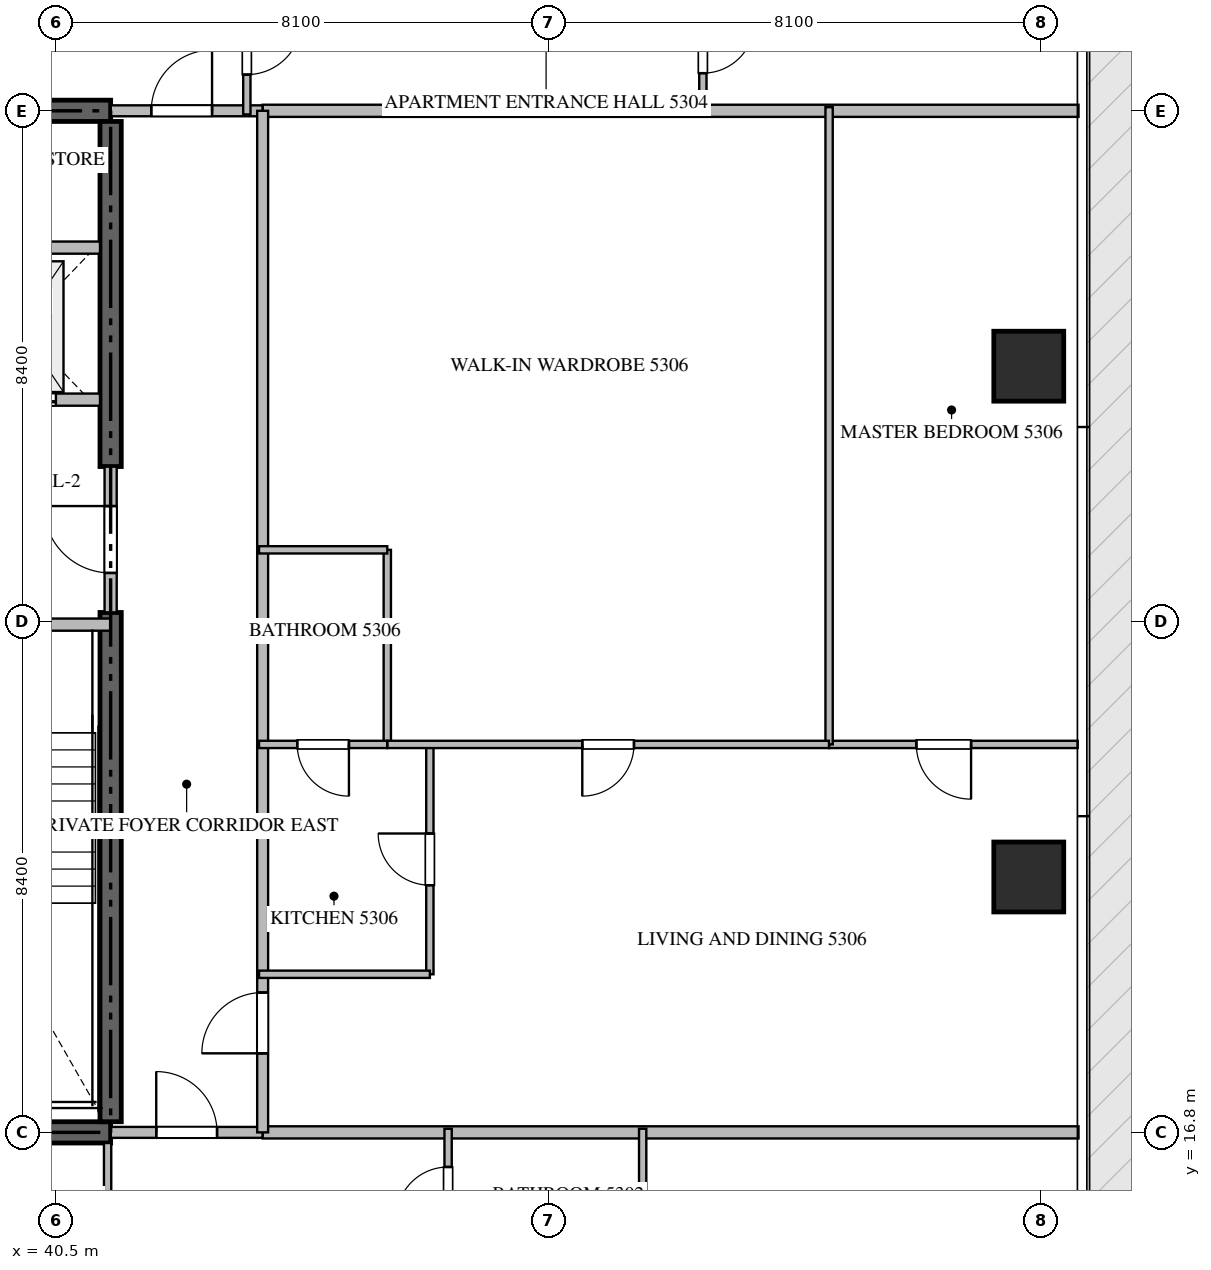
"""IFC4 building model, lengths in metres.
Left out: names, types, materials, properties, quantities, classifications, styles, units other than length and angle.
Written with IfcOpenShell. Run it as: python <this file> out.ifc"""

import sys

from ifc_helpers import new_model, si_unit, direction, frame, frame_2d, origin, origin_2d, place, context, subcontext, project, spatial, rectangle, extrude, source, transform, mapped, element, fill, save


model = new_model("IFC4")
c1 = context("Model", 3, precision=1e-05, world=origin(), true_north=direction((0.0, 1.0)))
c2 = subcontext(c1, "Body", "Model", "MODEL_VIEW")
j1 = project(units=[si_unit("LENGTHUNIT", "METRE"), si_unit("PLANEANGLEUNIT", "RADIAN")], contexts=[c1])
p1 = place(None, origin())
s1 = spatial("IfcSite", under=j1, at=p1, CompositionType="ELEMENT")
p2 = place(p1, origin())
s2 = spatial("IfcBuilding", under=s1, at=p2, CompositionType="ELEMENT")
p3 = place(p2, frame((0.0, 0.0, 214.3)))
s3 = spatial("IfcBuildingStorey", under=s2, at=p3, CompositionType="ELEMENT", Elevation=214.3)
for number, where, z_axis, x_axis in (
    (1, (23.4, 16.8, -0.26), (0.0, 0.0, 1.0), (1.0, 0.0, 0.0)),
    (2, (41.4, 33.6, -0.26), (0.0, 0.0, 1.0), (-1.0, 0.0, 0.0)),
):
    element("IfcWall", number, at=place(p3, frame(where, z_axis=z_axis, x_axis=x_axis)), inside=s3, PredefinedType="SHEAR", context=c2, shape_type="SweptSolid", body=[
        extrude(rectangle(XDim=18.0, YDim=0.35, at=frame_2d((9.0, 0.0))), origin(), (0.0, 0.0, 1.0), 3.848),
    ])
p4 = place(p3, frame((41.4, 16.975, -0.26), z_axis=(0.0, 0.0, 1.0), x_axis=(0.0, 1.0, 0.0)))
e3 = element("IfcWall", 3, at=p4, inside=s3, PredefinedType="SHEAR", context=c2, shape_type="SweptSolid", body=[
    extrude(rectangle(XDim=8.375, YDim=0.35, at=frame_2d((4.188, 0.0))), origin(), (0.0, 0.0, 1.0), 3.848),
])
p5 = place(p3, frame((41.4, 27.75, -0.26), z_axis=(0.0, 0.0, 1.0), x_axis=(0.0, 1.0, 0.0)))
e4 = element("IfcWall", 4, at=p5, inside=s3, PredefinedType="SHEAR", context=c2, shape_type="SweptSolid", body=[
    extrude(rectangle(XDim=5.675, YDim=0.35, at=frame_2d((2.837, 0.0))), origin(), (0.0, 0.0, 1.0), 3.848),
])
m1 = source(origin(), c2, "Body", "SweptSolid", [
    extrude(rectangle(XDim=1.15, YDim=1.15, at=origin_2d()), origin(), (0.0, 0.0, 1.0), 3.85),
])
for number, where, z_axis, x_axis in (
    (5, (56.5, 21.0, -0.26), (0.0, 0.0, 1.0), (1.0, 0.0, 0.0)),
    (6, (56.5, 29.4, -0.26), (0.0, 0.0, 1.0), (1.0, 0.0, 0.0)),
):
    element("IfcColumn", number, at=place(p3, frame(where, z_axis=z_axis, x_axis=x_axis)), inside=s3, PredefinedType="COLUMN", context=c2, shape_type="MappedRepresentation", body=[
        mapped(m1, transform((0.0, 0.0, 0.0), scale=1.0)),
    ])
p6 = place(p3, frame((36.95, 25.15, 0.0), z_axis=(0.0, 0.0, 1.0), x_axis=(1.0, 0.0, 0.0)))
e7 = element("IfcWall", 7, at=p6, inside=s3, PredefinedType="STANDARD", context=c2, shape_type="SweptSolid", body=[
    extrude(rectangle(XDim=4.45, YDim=0.2, at=frame_2d((2.225, 0.0))), origin(), (0.0, 0.0, 1.0), 3.59),
])
p7 = place(p6, frame((1.65, 0.0, 0.0)))
e8 = element("IfcOpeningElement", 8, at=p7, cuts=e7, PredefinedType="OPENING", context=c2, shape_type="SweptSolid", body=[
    extrude(rectangle(XDim=1.1, YDim=2.15, at=frame_2d((0.55, 1.075))), frame((0.0, 0.11, 0.0), z_axis=(0.0, -1.0, 0.0), x_axis=(1.0, 0.0, 0.0)), (0.0, 0.0, 1.0), 0.22),
])
p8 = place(p3, frame((38.75, 28.85, 0.0), z_axis=(0.0, 0.0, 1.0), x_axis=(1.0, 0.0, 0.0)))
e9 = element("IfcWall", 9, at=p8, inside=s3, PredefinedType="STANDARD", context=c2, shape_type="SweptSolid", body=[
    extrude(rectangle(XDim=2.475, YDim=0.2, at=frame_2d((1.238, 0.0))), origin(), (0.0, 0.0, 1.0), 3.59),
])
p9 = place(p8, frame((0.55, 0.0, 0.0)))
e10 = element("IfcOpeningElement", 10, at=p9, cuts=e9, PredefinedType="OPENING", context=c2, shape_type="SweptSolid", body=[
    extrude(rectangle(XDim=1.2, YDim=2.2, at=frame_2d((0.6, 1.1))), frame((0.0, 0.11, 0.0), z_axis=(0.0, -1.0, 0.0), x_axis=(1.0, 0.0, 0.0)), (0.0, 0.0, 1.0), 0.22),
])
p10 = place(p3, frame((38.75, 31.35, 0.0), z_axis=(0.0, 0.0, 1.0), x_axis=(1.0, 0.0, 0.0)))
e11 = element("IfcWall", 11, at=p10, inside=s3, PredefinedType="STANDARD", context=c2, shape_type="SweptSolid", body=[
    extrude(rectangle(XDim=2.475, YDim=0.2, at=frame_2d((1.238, 0.0))), origin(), (0.0, 0.0, 1.0), 3.59),
])
p11 = place(p3, frame((41.4, 25.352, 0.0), z_axis=(0.0, 0.0, 1.0), x_axis=(0.0, 1.0, 0.0)))
e12 = element("IfcWall", 12, at=p11, inside=s3, PredefinedType="STANDARD", context=c2, shape_type="SweptSolid", body=[
    extrude(rectangle(XDim=2.396, YDim=0.2, at=frame_2d((1.198, 0.0))), origin(), (0.0, 0.0, 1.0), 3.59),
])
p12 = place(p11, frame((0.648, 0.0, 0.0)))
e13 = element("IfcOpeningElement", 13, at=p12, cuts=e12, PredefinedType="OPENING", context=c2, shape_type="SweptSolid", body=[
    extrude(rectangle(XDim=1.1, YDim=2.15, at=frame_2d((0.55, 1.075))), frame((0.0, 0.11, 0.0), z_axis=(0.0, -1.0, 0.0), x_axis=(1.0, 0.0, 0.0)), (0.0, 0.0, 1.0), 0.22),
])
for number, where, z_axis, x_axis in (
    (14, (43.9, 16.8, 0.0), (0.0, 0.0, 1.0), (1.0, 0.0, 0.0)),
    (15, (43.9, 33.6, 0.0), (0.0, 0.0, 1.0), (1.0, 0.0, 0.0)),
):
    element("IfcWall", number, at=place(p3, frame(where, z_axis=z_axis, x_axis=x_axis)), inside=s3, PredefinedType="PARTITIONING", context=c2, shape_type="SweptSolid", body=[
        extrude(rectangle(XDim=13.418, YDim=0.2, at=frame_2d((6.709, 0.0))), origin(), (0.0, 0.0, 1.0), 3.59),
    ])
p13 = place(p3, frame((41.402, 16.8, 0.0), z_axis=(0.0, 0.0, 1.0), x_axis=(1.0, 0.0, 0.0)))
e16 = element("IfcWall", 16, at=p13, inside=s3, PredefinedType="PARTITIONING", context=c2, shape_type="SweptSolid", body=[
    extrude(rectangle(XDim=2.496, YDim=0.18, at=frame_2d((1.248, 0.0))), origin(), (0.0, 0.0, 1.0), 3.59),
])
p14 = place(p13, frame((0.748, 0.0, 0.0)))
e17 = element("IfcOpeningElement", 17, at=p14, cuts=e16, PredefinedType="OPENING", context=c2, shape_type="SweptSolid", body=[
    extrude(rectangle(XDim=1.0, YDim=2.15, at=frame_2d((0.5, 1.075))), frame((0.0, 0.1, 0.0), z_axis=(0.0, -1.0, 0.0), x_axis=(1.0, 0.0, 0.0)), (0.0, 0.0, 1.0), 0.2),
])
p15 = place(p3, frame((41.402, 33.6, 0.0), z_axis=(0.0, 0.0, 1.0), x_axis=(1.0, 0.0, 0.0)))
e18 = element("IfcWall", 18, at=p15, inside=s3, PredefinedType="PARTITIONING", context=c2, shape_type="SweptSolid", body=[
    extrude(rectangle(XDim=2.496, YDim=0.18, at=frame_2d((1.248, 0.0))), origin(), (0.0, 0.0, 1.0), 3.59),
])
p16 = place(p15, frame((0.666, 0.0, 0.0)))
e19 = element("IfcOpeningElement", 19, at=p16, cuts=e18, PredefinedType="OPENING", context=c2, shape_type="SweptSolid", body=[
    extrude(rectangle(XDim=1.0, YDim=2.15, at=frame_2d((0.5, 1.075))), frame((0.0, 0.1, 0.0), z_axis=(0.0, -1.0, 0.0), x_axis=(1.0, 0.0, 0.0)), (0.0, 0.0, 1.0), 0.2),
])
p17 = place(p3, frame((43.9, 16.8, 0.0), z_axis=(0.0, 0.0, 1.0), x_axis=(0.0, 1.0, 0.0)))
e20 = element("IfcWall", 20, at=p17, inside=s3, PredefinedType="PARTITIONING", context=c2, shape_type="SweptSolid", body=[
    extrude(rectangle(XDim=16.8, YDim=0.18, at=frame_2d((8.4, 0.0))), origin(), (0.0, 0.0, 1.0), 3.59),
])
p18 = place(p17, frame((1.3, 0.0, 0.0)))
e21 = element("IfcOpeningElement", 21, at=p18, cuts=e20, PredefinedType="OPENING", context=c2, shape_type="SweptSolid", body=[
    extrude(rectangle(XDim=1.0, YDim=2.15, at=frame_2d((0.5, 1.075))), frame((0.0, 0.1, 0.0), z_axis=(0.0, -1.0, 0.0), x_axis=(1.0, 0.0, 0.0)), (0.0, 0.0, 1.0), 0.2),
])
p19 = place(p3, frame((41.35, 14.05, 0.0), z_axis=(0.0, 0.0, 1.0), x_axis=(0.0, 1.0, 0.0)))
e22 = element("IfcWall", 22, at=p19, inside=s3, PredefinedType="PARTITIONING", context=c2, shape_type="SweptSolid", body=[
    extrude(rectangle(XDim=2.575, YDim=0.12, at=frame_2d((1.288, 0.0))), origin(), (0.0, 0.0, 1.0), 3.59),
])
p20 = place(p3, frame((50.15, 14.75, 0.0), z_axis=(0.0, 0.0, 1.0), x_axis=(0.0, 1.0, 0.0)))
e23 = element("IfcWall", 23, at=p20, inside=s3, PredefinedType="PARTITIONING", context=c2, shape_type="SweptSolid", body=[
    extrude(rectangle(XDim=2.11, YDim=0.12, at=frame_2d((1.055, 0.0))), origin(), (0.0, 0.0, 1.0), 3.59),
])
p21 = place(p3, frame((46.95, 14.752, 0.0), z_axis=(0.0, 0.0, 1.0), x_axis=(0.0, 1.0, 0.0)))
e24 = element("IfcWall", 24, at=p21, inside=s3, PredefinedType="PARTITIONING", context=c2, shape_type="SweptSolid", body=[
    extrude(rectangle(XDim=2.108, YDim=0.12, at=frame_2d((1.054, 0.0))), origin(), (0.0, 0.0, 1.0), 3.59),
])
p22 = place(p21, frame((0.629, 0.0, 0.0)))
e25 = element("IfcOpeningElement", 25, at=p22, cuts=e24, PredefinedType="OPENING", context=c2, shape_type="SweptSolid", body=[
    extrude(rectangle(XDim=0.85, YDim=2.1, at=frame_2d((0.425, 1.05))), frame((0.0, 0.07, 0.0), z_axis=(0.0, -1.0, 0.0), x_axis=(1.0, 0.0, 0.0)), (0.0, 0.0, 1.0), 0.14),
])
p23 = place(p3, frame((43.64, 35.75, 0.0), z_axis=(0.0, 0.0, 1.0), x_axis=(0.0, -1.0, 0.0)))
e26 = element("IfcWall", 26, at=p23, inside=s3, PredefinedType="PARTITIONING", context=c2, shape_type="SweptSolid", body=[
    extrude(rectangle(XDim=2.21, YDim=0.12, at=frame_2d((1.105, 0.0))), origin(), (0.0, 0.0, 1.0), 3.59),
])
p24 = place(p23, frame((0.655, 0.0, 0.0)))
e27 = element("IfcOpeningElement", 27, at=p24, cuts=e26, PredefinedType="OPENING", context=c2, shape_type="SweptSolid", body=[
    extrude(rectangle(XDim=0.9, YDim=2.1, at=frame_2d((0.45, 1.05))), frame((0.0, 0.07, 0.0), z_axis=(0.0, -1.0, 0.0), x_axis=(1.0, 0.0, 0.0)), (0.0, 0.0, 1.0), 0.14),
])
p25 = place(p3, frame((51.14, 35.748, 0.0), z_axis=(0.0, 0.0, 1.0), x_axis=(0.0, -1.0, 0.0)))
e28 = element("IfcWall", 28, at=p25, inside=s3, PredefinedType="PARTITIONING", context=c2, shape_type="SweptSolid", body=[
    extrude(rectangle(XDim=2.208, YDim=0.12, at=frame_2d((1.104, 0.0))), origin(), (0.0, 0.0, 1.0), 3.59),
])
p26 = place(p25, frame((0.679, 0.0, 0.0)))
e29 = element("IfcOpeningElement", 29, at=p26, cuts=e28, PredefinedType="OPENING", context=c2, shape_type="SweptSolid", body=[
    extrude(rectangle(XDim=0.85, YDim=2.1, at=frame_2d((0.425, 1.05))), frame((0.0, 0.07, 0.0), z_axis=(0.0, -1.0, 0.0), x_axis=(1.0, 0.0, 0.0)), (0.0, 0.0, 1.0), 0.14),
])
p27 = place(p3, frame((46.65, 19.4, 0.0), z_axis=(0.0, 0.0, 1.0), x_axis=(0.0, 1.0, 0.0)))
e30 = element("IfcWall", 30, at=p27, inside=s3, PredefinedType="PARTITIONING", context=c2, shape_type="SweptSolid", body=[
    extrude(rectangle(XDim=3.78, YDim=0.12, at=frame_2d((1.89, 0.0))), origin(), (0.0, 0.0, 1.0), 3.59),
])
p28 = place(p27, frame((1.465, 0.0, 0.0)))
e31 = element("IfcOpeningElement", 31, at=p28, cuts=e30, PredefinedType="OPENING", context=c2, shape_type="SweptSolid", body=[
    extrude(rectangle(XDim=0.85, YDim=2.1, at=frame_2d((0.425, 1.05))), frame((0.0, 0.07, 0.0), z_axis=(0.0, -1.0, 0.0), x_axis=(1.0, 0.0, 0.0)), (0.0, 0.0, 1.0), 0.14),
])
p29 = place(p3, frame((46.65, 19.4, 0.0), z_axis=(0.0, 0.0, 1.0), x_axis=(-1.0, 0.0, 0.0)))
e32 = element("IfcWall", 32, at=p29, inside=s3, PredefinedType="PARTITIONING", context=c2, shape_type="SweptSolid", body=[
    extrude(rectangle(XDim=2.81, YDim=0.12, at=frame_2d((1.405, 0.0))), origin(), (0.0, 0.0, 1.0), 3.59),
])
p30 = place(p3, frame((57.305, 23.18, 0.0), z_axis=(0.0, 0.0, 1.0), x_axis=(-1.0, 0.0, 0.0)))
e33 = element("IfcWall", 33, at=p30, inside=s3, PredefinedType="PARTITIONING", context=c2, shape_type="SweptSolid", body=[
    extrude(rectangle(XDim=4.089, YDim=0.12, at=frame_2d((2.044, 0.0))), origin(), (0.0, 0.0, 1.0), 3.59),
])
p31 = place(p30, frame((1.754, 0.0, 0.0)))
e34 = element("IfcOpeningElement", 34, at=p31, cuts=e33, PredefinedType="OPENING", context=c2, shape_type="SweptSolid", body=[
    extrude(rectangle(XDim=0.9, YDim=2.1, at=frame_2d((0.45, 1.05))), frame((0.0, 0.07, 0.0), z_axis=(0.0, -1.0, 0.0), x_axis=(1.0, 0.0, 0.0)), (0.0, 0.0, 1.0), 0.14),
])
p32 = place(p3, frame((53.216, 23.18, 0.0), z_axis=(0.0, 0.0, 1.0), x_axis=(0.0, 1.0, 0.0)))
e35 = element("IfcWall", 35, at=p32, inside=s3, PredefinedType="PARTITIONING", context=c2, shape_type="SweptSolid", body=[
    extrude(rectangle(XDim=10.48, YDim=0.12, at=frame_2d((5.24, 0.0))), origin(), (0.0, 0.0, 1.0), 3.59),
])
p33 = place(p3, frame((45.95, 23.18, 0.0), z_axis=(0.0, 0.0, 1.0), x_axis=(0.0, 1.0, 0.0)))
e36 = element("IfcWall", 36, at=p33, inside=s3, PredefinedType="PARTITIONING", context=c2, shape_type="SweptSolid", body=[
    extrude(rectangle(XDim=3.2, YDim=0.12, at=frame_2d((1.6, 0.0))), origin(), (0.0, 0.0, 1.0), 3.59),
])
p34 = place(p3, frame((45.95, 26.38, 0.0), z_axis=(0.0, 0.0, 1.0), x_axis=(-1.0, 0.0, 0.0)))
e37 = element("IfcWall", 37, at=p34, inside=s3, PredefinedType="PARTITIONING", context=c2, shape_type="SweptSolid", body=[
    extrude(rectangle(XDim=2.11, YDim=0.12, at=frame_2d((1.055, 0.0))), origin(), (0.0, 0.0, 1.0), 3.59),
])
p35 = place(p3, frame((53.214, 23.18, 0.0), z_axis=(0.0, 0.0, 1.0), x_axis=(-1.0, 0.0, 0.0)))
e38 = element("IfcWall", 38, at=p35, inside=s3, PredefinedType="PARTITIONING", context=c2, shape_type="SweptSolid", body=[
    extrude(rectangle(XDim=7.264, YDim=0.12, at=frame_2d((3.632, 0.0))), origin(), (0.0, 0.0, 1.0), 3.59),
])
p36 = place(p35, frame((3.207, 0.0, 0.0)))
e39 = element("IfcOpeningElement", 39, at=p36, cuts=e38, PredefinedType="OPENING", context=c2, shape_type="SweptSolid", body=[
    extrude(rectangle(XDim=0.85, YDim=2.1, at=frame_2d((0.425, 1.05))), frame((0.0, 0.07, 0.0), z_axis=(0.0, -1.0, 0.0), x_axis=(1.0, 0.0, 0.0)), (0.0, 0.0, 1.0), 0.14),
])
p37 = place(p3, frame((45.948, 23.18, 0.0), z_axis=(0.0, 0.0, 1.0), x_axis=(-1.0, 0.0, 0.0)))
e40 = element("IfcWall", 40, at=p37, inside=s3, PredefinedType="PARTITIONING", context=c2, shape_type="SweptSolid", body=[
    extrude(rectangle(XDim=2.108, YDim=0.12, at=frame_2d((1.054, 0.0))), origin(), (0.0, 0.0, 1.0), 3.59),
])
p38 = place(p37, frame((0.629, 0.0, 0.0)))
e41 = element("IfcOpeningElement", 41, at=p38, cuts=e40, PredefinedType="OPENING", context=c2, shape_type="SweptSolid", body=[
    extrude(rectangle(XDim=0.85, YDim=2.1, at=frame_2d((0.425, 1.05))), frame((0.0, 0.07, 0.0), z_axis=(0.0, -1.0, 0.0), x_axis=(1.0, 0.0, 0.0)), (0.0, 0.0, 1.0), 0.14),
])
m2 = source(origin(), c2, "Body", "SweptSolid", [
    extrude(rectangle(XDim=1.2, YDim=2.2, at=frame_2d((0.6, 1.1))), frame((0.0, 0.025, 0.0), z_axis=(0.0, -1.0, 0.0), x_axis=(1.0, 0.0, 0.0)), (0.0, 0.0, 1.0), 0.05),
])
p39 = place(p9, origin())
e42 = element("IfcDoor", 42, at=p39, inside=s3, OperationType="DOUBLE_DOOR_SLIDING", PredefinedType="DOOR", context=c2, shape_type="MappedRepresentation", body=[
    mapped(m2, transform((0.0, 0.0, 0.0), scale=1.0)),
])
fill(e10, e42)
m3 = source(origin(), c2, "Body", "SweptSolid", [
    extrude(rectangle(XDim=1.1, YDim=2.15, at=frame_2d((0.55, 1.075))), frame((0.0, 0.025, 0.0), z_axis=(0.0, -1.0, 0.0), x_axis=(1.0, 0.0, 0.0)), (0.0, 0.0, 1.0), 0.05),
])
p40 = place(p12, origin())
e43 = element("IfcDoor", 43, at=p40, inside=s3, OperationType="SINGLE_SWING_RIGHT", PredefinedType="DOOR", context=c2, shape_type="MappedRepresentation", body=[
    mapped(m3, transform((0.0, 0.0, 0.0), scale=1.0)),
])
fill(e13, e43)
m4 = source(origin(), c2, "Body", "SweptSolid", [
    extrude(rectangle(XDim=1.0, YDim=2.15, at=frame_2d((0.5, 1.075))), frame((0.0, 0.025, 0.0), z_axis=(0.0, -1.0, 0.0), x_axis=(1.0, 0.0, 0.0)), (0.0, 0.0, 1.0), 0.05),
])
p41 = place(p14, origin())
e44 = element("IfcDoor", 44, at=p41, inside=s3, OperationType="SINGLE_SWING_LEFT", PredefinedType="DOOR", context=c2, shape_type="MappedRepresentation", body=[
    mapped(m4, transform((0.0, 0.0, 0.0), scale=1.0)),
])
fill(e17, e44)
p42 = place(p16, origin())
e45 = element("IfcDoor", 45, at=p42, inside=s3, OperationType="SINGLE_SWING_RIGHT", PredefinedType="DOOR", context=c2, shape_type="MappedRepresentation", body=[
    mapped(m4, transform((0.0, 0.0, 0.0), scale=1.0)),
])
fill(e19, e45)
p43 = place(p18, origin())
e46 = element("IfcDoor", 46, at=p43, inside=s3, OperationType="SINGLE_SWING_LEFT", PredefinedType="DOOR", context=c2, shape_type="MappedRepresentation", body=[
    mapped(m4, transform((0.0, 0.0, 0.0), scale=1.0)),
])
fill(e21, e46)
m5 = source(origin(), c2, "Body", "SweptSolid", [
    extrude(rectangle(XDim=0.85, YDim=2.1, at=frame_2d((0.425, 1.05))), frame((0.0, 0.025, 0.0), z_axis=(0.0, -1.0, 0.0), x_axis=(1.0, 0.0, 0.0)), (0.0, 0.0, 1.0), 0.05),
])
p44 = place(p22, origin())
e47 = element("IfcDoor", 47, at=p44, inside=s3, OperationType="SINGLE_SWING_LEFT", PredefinedType="DOOR", context=c2, shape_type="MappedRepresentation", body=[
    mapped(m5, transform((0.0, 0.0, 0.0), scale=1.0)),
])
fill(e25, e47)
m6 = source(origin(), c2, "Body", "SweptSolid", [
    extrude(rectangle(XDim=0.9, YDim=2.1, at=frame_2d((0.45, 1.05))), frame((0.0, 0.025, 0.0), z_axis=(0.0, -1.0, 0.0), x_axis=(1.0, 0.0, 0.0)), (0.0, 0.0, 1.0), 0.05),
])
p45 = place(p24, origin())
e48 = element("IfcDoor", 48, at=p45, inside=s3, OperationType="SINGLE_SWING_LEFT", PredefinedType="DOOR", context=c2, shape_type="MappedRepresentation", body=[
    mapped(m6, transform((0.0, 0.0, 0.0), scale=1.0)),
])
fill(e27, e48)
p46 = place(p26, origin())
e49 = element("IfcDoor", 49, at=p46, inside=s3, OperationType="SINGLE_SWING_LEFT", PredefinedType="DOOR", context=c2, shape_type="MappedRepresentation", body=[
    mapped(m5, transform((0.0, 0.0, 0.0), scale=1.0)),
])
fill(e29, e49)
p47 = place(p28, origin())
e50 = element("IfcDoor", 50, at=p47, inside=s3, OperationType="SINGLE_SWING_RIGHT", PredefinedType="DOOR", context=c2, shape_type="MappedRepresentation", body=[
    mapped(m5, transform((0.0, 0.0, 0.0), scale=1.0)),
])
fill(e31, e50)
p48 = place(p31, origin())
e51 = element("IfcDoor", 51, at=p48, inside=s3, OperationType="SINGLE_SWING_LEFT", PredefinedType="DOOR", context=c2, shape_type="MappedRepresentation", body=[
    mapped(m6, transform((0.0, 0.0, 0.0), scale=1.0)),
])
fill(e34, e51)
p49 = place(p36, origin())
e52 = element("IfcDoor", 52, at=p49, inside=s3, OperationType="SINGLE_SWING_RIGHT", PredefinedType="DOOR", context=c2, shape_type="MappedRepresentation", body=[
    mapped(m5, transform((0.0, 0.0, 0.0), scale=1.0)),
])
fill(e39, e52)
p50 = place(p38, origin())
e53 = element("IfcDoor", 53, at=p50, inside=s3, OperationType="SINGLE_SWING_LEFT", PredefinedType="DOOR", context=c2, shape_type="MappedRepresentation", body=[
    mapped(m5, transform((0.0, 0.0, 0.0), scale=1.0)),
])
fill(e41, e53)
save(model, sys.argv[1])
